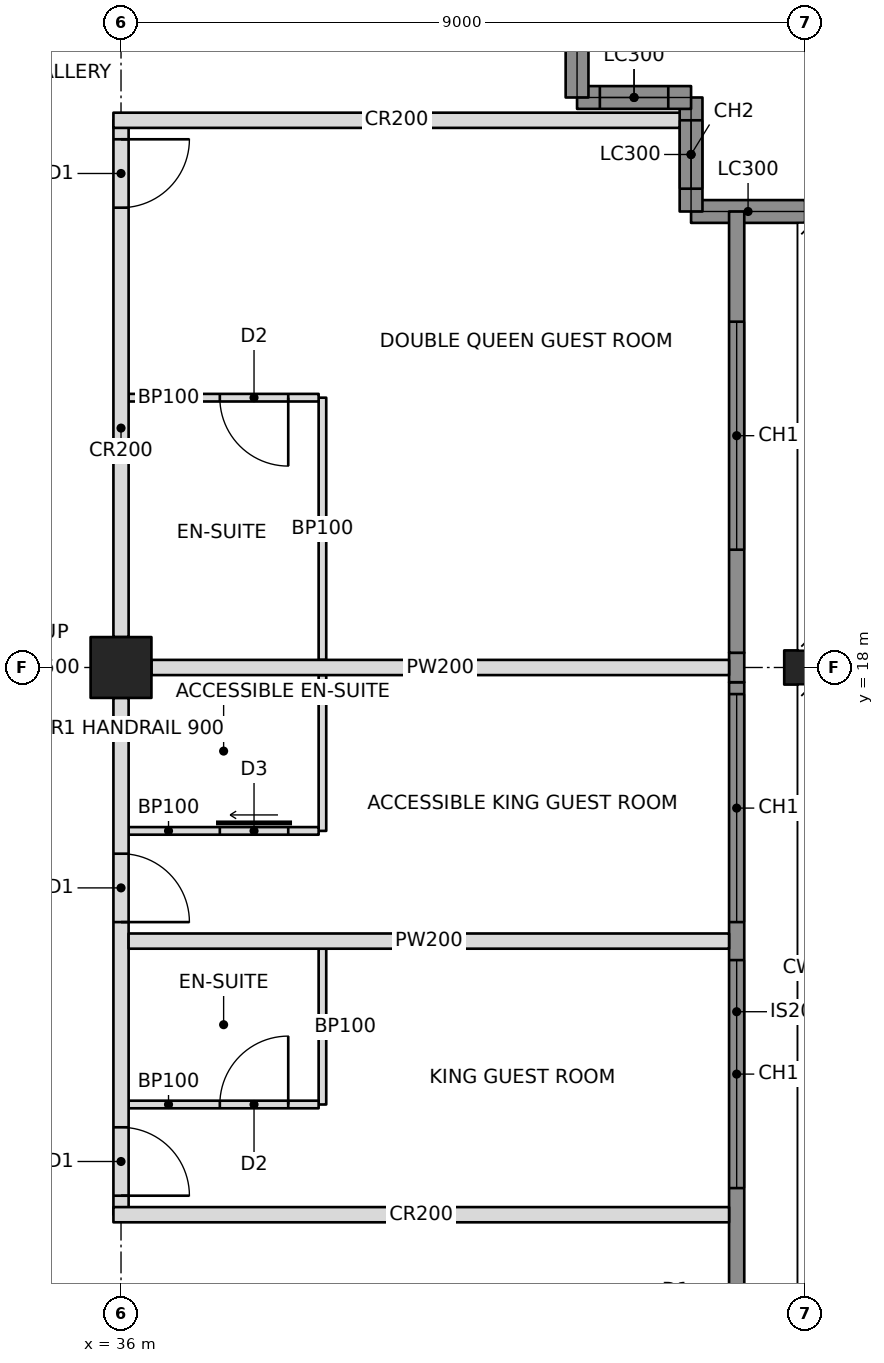
"""IFC4 building model, lengths in metres.
Left out: names, types, materials, properties, quantities, classifications, styles, units other than length and angle.
Written with IfcOpenShell. Run it as: python <this file> out.ifc"""

import sys

from ifc_helpers import new_model, si_unit, direction, frame, frame_2d, origin, origin_2d, place, context, subcontext, project, spatial, rectangle, hollow_rectangle, i_section, extrude, element, fill, save


model = new_model("IFC4")
c1 = context("Model", 3, precision=1e-05, world=origin(), true_north=direction((0.0, 1.0)))
c2 = subcontext(c1, "Body", "Model", "MODEL_VIEW")
j1 = project(units=[si_unit("LENGTHUNIT", "METRE"), si_unit("PLANEANGLEUNIT", "RADIAN")], contexts=[c1])
p1 = place(None, origin())
s1 = spatial("IfcSite", under=j1, at=p1, CompositionType="ELEMENT")
p2 = place(p1, origin())
s2 = spatial("IfcBuilding", under=s1, at=p2, CompositionType="ELEMENT")
p3 = place(p2, frame((0.0, 0.0, 167.2)))
s3 = spatial("IfcBuildingStorey", under=s2, at=p3, CompositionType="ELEMENT", Elevation=167.2)
p4 = place(p3, frame((36.0, 18.0, 0.0), z_axis=(0.0, 0.0, 1.0), x_axis=(0.0, 1.0, 0.0)))
e1 = element("IfcColumn", 1, at=p4, inside=s3, PredefinedType="COLUMN", context=c2, shape_type="SweptSolid", body=[
    extrude(hollow_rectangle(XDim=0.8, YDim=0.8, WallThickness=0.06, at=origin_2d()), origin(), (0.0, 0.0, 1.0), 3.4),
])
p5 = place(p3, frame((45.0, 18.0, 0.0), z_axis=(0.0, 0.0, 1.0), x_axis=(0.0, 1.0, 0.0)))
e2 = element("IfcColumn", 2, at=p5, inside=s3, PredefinedType="COLUMN", context=c2, shape_type="SweptSolid", body=[
    extrude(i_section(OverallWidth=0.449, OverallDepth=0.549, WebThickness=0.072, FlangeThickness=0.115, at=origin_2d()), origin(), (0.0, 0.0, 1.0), 3.4),
])
p6 = place(p3, frame((45.0, 24.0, 0.0), z_axis=(0.0, 0.0, 1.0), x_axis=(-1.0, 0.0, 0.0)))
e3 = element("IfcWall", 3, at=p6, inside=s3, PredefinedType="SOLIDWALL", context=c2, shape_type="SweptSolid", body=[
    extrude(rectangle(XDim=1.5, YDim=0.3, at=frame_2d((0.75, 0.0))), origin(), (0.0, 0.0, 1.0), 2.42),
])
p7 = place(p3, frame((43.5, 24.0, 0.0), z_axis=(0.0, 0.0, 1.0), x_axis=(0.0, 1.0, 0.0)))
e4 = element("IfcWall", 4, at=p7, inside=s3, PredefinedType="SOLIDWALL", context=c2, shape_type="SweptSolid", body=[
    extrude(rectangle(XDim=1.5, YDim=0.3, at=frame_2d((0.75, 0.0))), origin(), (0.0, 0.0, 1.0), 3.2),
])
p8 = place(p7, frame((0.3, 0.0, 0.6)))
e5 = element("IfcOpeningElement", 5, at=p8, cuts=e4, PredefinedType="OPENING", context=c2, shape_type="SweptSolid", body=[
    extrude(rectangle(XDim=0.9, YDim=2.2, at=frame_2d((0.45, 1.1))), frame((0.0, 0.16, 0.0), z_axis=(0.0, -1.0, 0.0), x_axis=(1.0, 0.0, 0.0)), (0.0, 0.0, 1.0), 0.32),
])
p9 = place(p3, frame((43.5, 25.5, 0.0), z_axis=(0.0, 0.0, 1.0), x_axis=(-1.0, 0.0, 0.0)))
e6 = element("IfcWall", 6, at=p9, inside=s3, PredefinedType="SOLIDWALL", context=c2, shape_type="SweptSolid", body=[
    extrude(rectangle(XDim=1.5, YDim=0.3, at=frame_2d((0.75, 0.0))), origin(), (0.0, 0.0, 1.0), 3.2),
])
p10 = place(p9, frame((0.3, 0.0, 0.6)))
e7 = element("IfcOpeningElement", 7, at=p10, cuts=e6, PredefinedType="OPENING", context=c2, shape_type="SweptSolid", body=[
    extrude(rectangle(XDim=0.9, YDim=2.2, at=frame_2d((0.45, 1.1))), frame((0.0, 0.16, 0.0), z_axis=(0.0, -1.0, 0.0), x_axis=(1.0, 0.0, 0.0)), (0.0, 0.0, 1.0), 0.32),
])
p11 = place(p3, frame((42.0, 25.5, 0.0), z_axis=(0.0, 0.0, 1.0), x_axis=(0.0, 1.0, 0.0)))
e8 = element("IfcWall", 8, at=p11, inside=s3, PredefinedType="SOLIDWALL", context=c2, shape_type="SweptSolid", body=[
    extrude(rectangle(XDim=1.5, YDim=0.3, at=frame_2d((0.75, 0.0))), origin(), (0.0, 0.0, 1.0), 2.42),
])
p12 = place(p3, frame((36.0, 10.8, 0.0), z_axis=(0.0, 0.0, 1.0), x_axis=(0.0, 1.0, 0.0)))
e9 = element("IfcWall", 9, at=p12, inside=s3, PredefinedType="PARTITIONING", context=c2, shape_type="SweptSolid", body=[
    extrude(rectangle(XDim=6.8, YDim=0.2, at=frame_2d((3.4, 0.0))), origin(), (0.0, 0.0, 1.0), 2.405),
])
p13 = place(p12, frame((0.25, 0.0, 0.0)))
e10 = element("IfcOpeningElement", 10, at=p13, cuts=e9, PredefinedType="OPENING", context=c2, shape_type="SweptSolid", body=[
    extrude(rectangle(XDim=0.9, YDim=2.1, at=frame_2d((0.45, 1.05))), frame((0.0, 0.11, 0.0), z_axis=(0.0, -1.0, 0.0), x_axis=(1.0, 0.0, 0.0)), (0.0, 0.0, 1.0), 0.22),
])
p14 = place(p12, frame((3.85, 0.0, 0.0)))
e11 = element("IfcOpeningElement", 11, at=p14, cuts=e9, PredefinedType="OPENING", context=c2, shape_type="SweptSolid", body=[
    extrude(rectangle(XDim=0.9, YDim=2.1, at=frame_2d((0.45, 1.05))), frame((0.0, 0.11, 0.0), z_axis=(0.0, -1.0, 0.0), x_axis=(1.0, 0.0, 0.0)), (0.0, 0.0, 1.0), 0.22),
])
p15 = place(p3, frame((36.0, 18.4, 0.0), z_axis=(0.0, 0.0, 1.0), x_axis=(0.0, 1.0, 0.0)))
e12 = element("IfcWall", 12, at=p15, inside=s3, PredefinedType="PARTITIONING", context=c2, shape_type="SweptSolid", body=[
    extrude(rectangle(XDim=6.8, YDim=0.2, at=frame_2d((3.4, 0.0))), origin(), (0.0, 0.0, 1.0), 2.405),
])
p16 = place(p15, frame((5.65, 0.0, 0.0)))
e13 = element("IfcOpeningElement", 13, at=p16, cuts=e12, PredefinedType="OPENING", context=c2, shape_type="SweptSolid", body=[
    extrude(rectangle(XDim=0.9, YDim=2.1, at=frame_2d((0.45, 1.05))), frame((0.0, 0.11, 0.0), z_axis=(0.0, -1.0, 0.0), x_axis=(1.0, 0.0, 0.0)), (0.0, 0.0, 1.0), 0.22),
])
p17 = place(p3, frame((35.9, 10.8, 0.0), z_axis=(0.0, 0.0, 1.0), x_axis=(1.0, 0.0, 0.0)))
e14 = element("IfcWall", 14, at=p17, inside=s3, PredefinedType="PARTITIONING", context=c2, shape_type="SweptSolid", body=[
    extrude(rectangle(XDim=8.1, YDim=0.2, at=frame_2d((4.05, 0.0))), origin(), (0.0, 0.0, 1.0), 2.404),
])
p18 = place(p3, frame((35.9, 25.2, 0.0), z_axis=(0.0, 0.0, 1.0), x_axis=(1.0, 0.0, 0.0)))
e15 = element("IfcWall", 15, at=p18, inside=s3, PredefinedType="PARTITIONING", context=c2, shape_type="SweptSolid", body=[
    extrude(rectangle(XDim=7.45, YDim=0.2, at=frame_2d((3.725, 0.0))), origin(), (0.0, 0.0, 1.0), 2.404),
])
p19 = place(p3, frame((36.1, 14.4, 0.0), z_axis=(0.0, 0.0, 1.0), x_axis=(1.0, 0.0, 0.0)))
e16 = element("IfcWall", 16, at=p19, inside=s3, PredefinedType="PARTITIONING", context=c2, shape_type="SweptSolid", body=[
    extrude(rectangle(XDim=7.9, YDim=0.2, at=frame_2d((3.95, 0.0))), origin(), (0.0, 0.0, 1.0), 2.404),
])
p20 = place(p3, frame((36.4, 18.0, 0.0), z_axis=(0.0, 0.0, 1.0), x_axis=(1.0, 0.0, 0.0)))
e17 = element("IfcWall", 17, at=p20, inside=s3, PredefinedType="PARTITIONING", context=c2, shape_type="SweptSolid", body=[
    extrude(rectangle(XDim=7.6, YDim=0.2, at=frame_2d((3.8, 0.0))), origin(), (0.0, 0.0, 1.0), 2.405),
])
p21 = place(p3, frame((38.65, 12.25, 0.0), z_axis=(0.0, 0.0, 1.0), x_axis=(0.0, 1.0, 0.0)))
e18 = element("IfcWall", 18, at=p21, inside=s3, PredefinedType="PARTITIONING", context=c2, shape_type="SweptSolid", body=[
    extrude(rectangle(XDim=2.05, YDim=0.1, at=frame_2d((1.025, 0.0))), origin(), (0.0, 0.0, 1.0), 3.2),
])
p22 = place(p3, frame((36.1, 12.25, 0.0), z_axis=(0.0, 0.0, 1.0), x_axis=(1.0, 0.0, 0.0)))
e19 = element("IfcWall", 19, at=p22, inside=s3, PredefinedType="PARTITIONING", context=c2, shape_type="SweptSolid", body=[
    extrude(rectangle(XDim=2.5, YDim=0.1, at=frame_2d((1.25, 0.0))), origin(), (0.0, 0.0, 1.0), 2.404),
])
p23 = place(p22, frame((1.2, 0.0, 0.0)))
e20 = element("IfcOpeningElement", 20, at=p23, cuts=e19, PredefinedType="OPENING", context=c2, shape_type="SweptSolid", body=[
    extrude(rectangle(XDim=0.9, YDim=2.1, at=frame_2d((0.45, 1.05))), frame((0.0, 0.06, 0.0), z_axis=(0.0, -1.0, 0.0), x_axis=(1.0, 0.0, 0.0)), (0.0, 0.0, 1.0), 0.12),
])
p24 = place(p3, frame((38.65, 15.85, 0.0), z_axis=(0.0, 0.0, 1.0), x_axis=(0.0, 1.0, 0.0)))
e21 = element("IfcWall", 21, at=p24, inside=s3, PredefinedType="PARTITIONING", context=c2, shape_type="SweptSolid", body=[
    extrude(rectangle(XDim=2.05, YDim=0.1, at=frame_2d((1.025, 0.0))), origin(), (0.0, 0.0, 1.0), 2.404),
])
p25 = place(p3, frame((36.1, 15.85, 0.0), z_axis=(0.0, 0.0, 1.0), x_axis=(1.0, 0.0, 0.0)))
e22 = element("IfcWall", 22, at=p25, inside=s3, PredefinedType="PARTITIONING", context=c2, shape_type="SweptSolid", body=[
    extrude(rectangle(XDim=2.5, YDim=0.1, at=frame_2d((1.25, 0.0))), origin(), (0.0, 0.0, 1.0), 2.404),
])
p26 = place(p25, frame((1.2, 0.0, 0.0)))
e23 = element("IfcOpeningElement", 23, at=p26, cuts=e22, PredefinedType="OPENING", context=c2, shape_type="SweptSolid", body=[
    extrude(rectangle(XDim=0.9, YDim=2.1, at=frame_2d((0.45, 1.05))), frame((0.0, 0.06, 0.0), z_axis=(0.0, -1.0, 0.0), x_axis=(1.0, 0.0, 0.0)), (0.0, 0.0, 1.0), 0.12),
])
p27 = place(p3, frame((38.65, 18.1, 0.0), z_axis=(0.0, 0.0, 1.0), x_axis=(0.0, 1.0, 0.0)))
e24 = element("IfcWall", 24, at=p27, inside=s3, PredefinedType="PARTITIONING", context=c2, shape_type="SweptSolid", body=[
    extrude(rectangle(XDim=3.45, YDim=0.1, at=frame_2d((1.725, 0.0))), origin(), (0.0, 0.0, 1.0), 2.404),
])
p28 = place(p3, frame((36.1, 21.55, 0.0), z_axis=(0.0, 0.0, 1.0), x_axis=(1.0, 0.0, 0.0)))
e25 = element("IfcWall", 25, at=p28, inside=s3, PredefinedType="PARTITIONING", context=c2, shape_type="SweptSolid", body=[
    extrude(rectangle(XDim=2.5, YDim=0.1, at=frame_2d((1.25, 0.0))), origin(), (0.0, 0.0, 1.0), 2.404),
])
p29 = place(p28, frame((1.2, 0.0, 0.0)))
e26 = element("IfcOpeningElement", 26, at=p29, cuts=e25, PredefinedType="OPENING", context=c2, shape_type="SweptSolid", body=[
    extrude(rectangle(XDim=0.9, YDim=2.1, at=frame_2d((0.45, 1.05))), frame((0.0, 0.06, 0.0), z_axis=(0.0, -1.0, 0.0), x_axis=(1.0, 0.0, 0.0)), (0.0, 0.0, 1.0), 0.12),
])
p30 = place(p3, frame((44.1, 9.135, 0.0), z_axis=(0.0, 0.0, 1.0), x_axis=(0.0, 1.0, 0.0)))
e27 = element("IfcWall", 27, at=p30, inside=s3, PredefinedType="SOLIDWALL", context=c2, shape_type="SweptSolid", body=[
    extrude(rectangle(XDim=8.671, YDim=0.2, at=frame_2d((4.335, 0.0))), origin(), (0.0, 0.0, 1.0), 3.2),
])
p31 = place(p30, frame((2.015, 0.0, 0.6)))
e28 = element("IfcOpeningElement", 28, at=p31, cuts=e27, PredefinedType="OPENING", context=c2, shape_type="SweptSolid", body=[
    extrude(rectangle(XDim=3.0, YDim=2.2, at=frame_2d((1.5, 1.1))), frame((0.0, 0.11, 0.0), z_axis=(0.0, -1.0, 0.0), x_axis=(1.0, 0.0, 0.0)), (0.0, 0.0, 1.0), 0.22),
])
p32 = place(p30, frame((5.515, 0.0, 0.6)))
e29 = element("IfcOpeningElement", 29, at=p32, cuts=e27, PredefinedType="OPENING", context=c2, shape_type="SweptSolid", body=[
    extrude(rectangle(XDim=3.0, YDim=2.2, at=frame_2d((1.5, 1.1))), frame((0.0, 0.11, 0.0), z_axis=(0.0, -1.0, 0.0), x_axis=(1.0, 0.0, 0.0)), (0.0, 0.0, 1.0), 0.22),
])
p33 = place(p3, frame((44.1, 17.806, 0.0), z_axis=(0.0, 0.0, 1.0), x_axis=(0.0, 1.0, 0.0)))
e30 = element("IfcWall", 30, at=p33, inside=s3, PredefinedType="SOLIDWALL", context=c2, shape_type="SweptSolid", body=[
    extrude(rectangle(XDim=0.388, YDim=0.2, at=frame_2d((0.194, 0.0))), origin(), (0.0, 0.0, 1.0), 2.404),
])
p34 = place(p3, frame((44.1, 18.194, 0.0), z_axis=(0.0, 0.0, 1.0), x_axis=(0.0, 1.0, 0.0)))
e31 = element("IfcWall", 31, at=p34, inside=s3, PredefinedType="SOLIDWALL", context=c2, shape_type="SweptSolid", body=[
    extrude(rectangle(XDim=5.806, YDim=0.2, at=frame_2d((2.903, 0.0))), origin(), (0.0, 0.0, 1.0), 3.2),
])
p35 = place(p34, frame((1.356, 0.0, 0.6)))
e32 = element("IfcOpeningElement", 32, at=p35, cuts=e31, PredefinedType="OPENING", context=c2, shape_type="SweptSolid", body=[
    extrude(rectangle(XDim=3.0, YDim=2.2, at=frame_2d((1.5, 1.1))), frame((0.0, 0.11, 0.0), z_axis=(0.0, -1.0, 0.0), x_axis=(1.0, 0.0, 0.0)), (0.0, 0.0, 1.0), 0.22),
])
p36 = place(p8, origin())
e33 = element("IfcWindow", 33, at=p36, inside=s3, PartitioningType="SINGLE_PANEL", PredefinedType="WINDOW", context=c2, shape_type="SweptSolid", body=[
    extrude(rectangle(XDim=0.9, YDim=2.2, at=frame_2d((0.45, 1.1))), frame((0.0, 0.03, 0.0), z_axis=(0.0, -1.0, 0.0), x_axis=(1.0, 0.0, 0.0)), (0.0, 0.0, 1.0), 0.06),
])
fill(e5, e33)
p37 = place(p10, origin())
e34 = element("IfcWindow", 34, at=p37, inside=s3, PartitioningType="SINGLE_PANEL", PredefinedType="WINDOW", context=c2, shape_type="SweptSolid", body=[
    extrude(rectangle(XDim=0.9, YDim=2.2, at=frame_2d((0.45, 1.1))), frame((0.0, 0.03, 0.0), z_axis=(0.0, -1.0, 0.0), x_axis=(1.0, 0.0, 0.0)), (0.0, 0.0, 1.0), 0.06),
])
fill(e7, e34)
p38 = place(p31, origin())
e35 = element("IfcWindow", 35, at=p38, inside=s3, PartitioningType="TRIPLE_PANEL_VERTICAL", PredefinedType="WINDOW", context=c2, shape_type="SweptSolid", body=[
    extrude(rectangle(XDim=3.0, YDim=2.2, at=frame_2d((1.5, 1.1))), frame((0.0, 0.03, 0.0), z_axis=(0.0, -1.0, 0.0), x_axis=(1.0, 0.0, 0.0)), (0.0, 0.0, 1.0), 0.06),
])
fill(e28, e35)
p39 = place(p32, origin())
e36 = element("IfcWindow", 36, at=p39, inside=s3, PartitioningType="TRIPLE_PANEL_VERTICAL", PredefinedType="WINDOW", context=c2, shape_type="SweptSolid", body=[
    extrude(rectangle(XDim=3.0, YDim=2.2, at=frame_2d((1.5, 1.1))), frame((0.0, 0.03, 0.0), z_axis=(0.0, -1.0, 0.0), x_axis=(1.0, 0.0, 0.0)), (0.0, 0.0, 1.0), 0.06),
])
fill(e29, e36)
p40 = place(p35, origin())
e37 = element("IfcWindow", 37, at=p40, inside=s3, PartitioningType="TRIPLE_PANEL_VERTICAL", PredefinedType="WINDOW", context=c2, shape_type="SweptSolid", body=[
    extrude(rectangle(XDim=3.0, YDim=2.2, at=frame_2d((1.5, 1.1))), frame((0.0, 0.03, 0.0), z_axis=(0.0, -1.0, 0.0), x_axis=(1.0, 0.0, 0.0)), (0.0, 0.0, 1.0), 0.06),
])
fill(e32, e37)
p41 = place(p23, origin())
e38 = element("IfcDoor", 38, at=p41, inside=s3, OperationType="SINGLE_SWING_RIGHT", PredefinedType="DOOR", context=c2, shape_type="SweptSolid", body=[
    extrude(rectangle(XDim=0.9, YDim=2.1, at=frame_2d((0.45, 1.05))), frame((0.0, 0.025, 0.0), z_axis=(0.0, -1.0, 0.0), x_axis=(1.0, 0.0, 0.0)), (0.0, 0.0, 1.0), 0.05),
])
fill(e20, e38)
p42 = place(p13, frame((0.9, 0.0, 0.0), z_axis=(0.0, 0.0, 1.0), x_axis=(-1.0, 0.0, 0.0)))
e39 = element("IfcDoor", 39, at=p42, inside=s3, OperationType="SINGLE_SWING_RIGHT", PredefinedType="DOOR", context=c2, shape_type="SweptSolid", body=[
    extrude(rectangle(XDim=0.9, YDim=2.1, at=frame_2d((0.45, 1.05))), frame((0.0, 0.025, 0.0), z_axis=(0.0, -1.0, 0.0), x_axis=(1.0, 0.0, 0.0)), (0.0, 0.0, 1.0), 0.05),
])
fill(e10, e39)
p43 = place(p26, origin())
e40 = element("IfcDoor", 40, at=p43, inside=s3, OperationType="SLIDING_TO_LEFT", PredefinedType="DOOR", context=c2, shape_type="SweptSolid", body=[
    extrude(rectangle(XDim=0.9, YDim=2.1, at=frame_2d((0.45, 1.05))), frame((0.0, 0.025, 0.0), z_axis=(0.0, -1.0, 0.0), x_axis=(1.0, 0.0, 0.0)), (0.0, 0.0, 1.0), 0.05),
])
fill(e23, e40)
p44 = place(p14, frame((0.9, 0.0, 0.0), z_axis=(0.0, 0.0, 1.0), x_axis=(-1.0, 0.0, 0.0)))
e41 = element("IfcDoor", 41, at=p44, inside=s3, OperationType="SINGLE_SWING_RIGHT", PredefinedType="DOOR", context=c2, shape_type="SweptSolid", body=[
    extrude(rectangle(XDim=0.9, YDim=2.1, at=frame_2d((0.45, 1.05))), frame((0.0, 0.025, 0.0), z_axis=(0.0, -1.0, 0.0), x_axis=(1.0, 0.0, 0.0)), (0.0, 0.0, 1.0), 0.05),
])
fill(e11, e41)
p45 = place(p29, frame((0.9, 0.0, 0.0), z_axis=(0.0, 0.0, 1.0), x_axis=(-1.0, 0.0, 0.0)))
e42 = element("IfcDoor", 42, at=p45, inside=s3, OperationType="SINGLE_SWING_LEFT", PredefinedType="DOOR", context=c2, shape_type="SweptSolid", body=[
    extrude(rectangle(XDim=0.9, YDim=2.1, at=frame_2d((0.45, 1.05))), frame((0.0, 0.025, 0.0), z_axis=(0.0, -1.0, 0.0), x_axis=(1.0, 0.0, 0.0)), (0.0, 0.0, 1.0), 0.05),
])
fill(e26, e42)
p46 = place(p16, frame((0.9, 0.0, 0.0), z_axis=(0.0, 0.0, 1.0), x_axis=(-1.0, 0.0, 0.0)))
e43 = element("IfcDoor", 43, at=p46, inside=s3, OperationType="SINGLE_SWING_LEFT", PredefinedType="DOOR", context=c2, shape_type="SweptSolid", body=[
    extrude(rectangle(XDim=0.9, YDim=2.1, at=frame_2d((0.45, 1.05))), frame((0.0, 0.025, 0.0), z_axis=(0.0, -1.0, 0.0), x_axis=(1.0, 0.0, 0.0)), (0.0, 0.0, 1.0), 0.05),
])
fill(e13, e43)
save(model, sys.argv[1])
